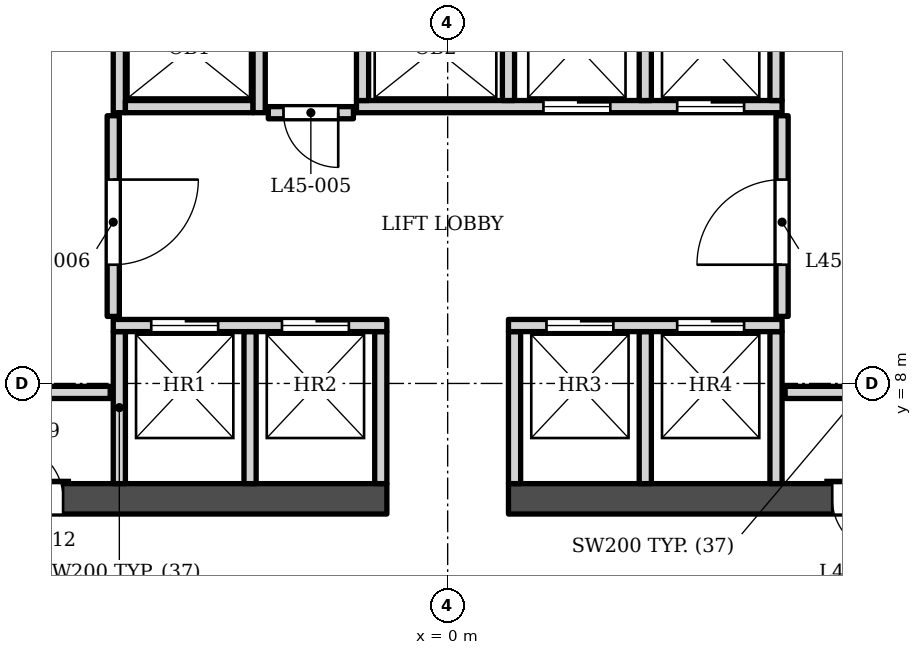
"""IFC4 building model, lengths in metres.
Left out: names, types, materials, properties, quantities, classifications, styles, units other than length and angle.
Written with IfcOpenShell. Run it as: python <this file> out.ifc"""

import sys

from ifc_helpers import new_model, si_unit, direction, frame, frame_2d, origin, place, context, subcontext, project, spatial, rectangle, extrude, element, fill, save


model = new_model("IFC4")
c1 = context("Model", 3, precision=1e-05, world=origin(), true_north=direction((0.0, 1.0)))
c2 = subcontext(c1, "Body", "Model", "MODEL_VIEW")
j1 = project(units=[si_unit("LENGTHUNIT", "METRE"), si_unit("PLANEANGLEUNIT", "RADIAN")], contexts=[c1])
p1 = place(None, origin())
s1 = spatial("IfcSite", under=j1, at=p1, CompositionType="ELEMENT")
p2 = place(p1, origin())
s2 = spatial("IfcBuilding", under=s1, at=p2, CompositionType="ELEMENT")
p3 = place(p2, frame((0.0, 0.0, 191.4)))
s3 = spatial("IfcBuildingStorey", under=s2, at=p3, CompositionType="ELEMENT", Elevation=191.4)
p4 = place(p3, frame((-8.05, 6.103, 0.0), z_axis=(0.0, 0.0, 1.0), x_axis=(1.0, 0.0, 0.0)))
e1 = element("IfcWall", 1, at=p4, inside=s3, PredefinedType="SHEAR", context=c2, shape_type="SweptSolid", body=[
    extrude(rectangle(XDim=7.05, YDim=0.5, at=frame_2d((3.525, 0.0))), origin(), (0.0, 0.0, 1.0), 5.0),
])
p5 = place(p4, frame((0.825, 0.0, 0.0)))
e2 = element("IfcOpeningElement", 2, at=p5, cuts=e1, PredefinedType="OPENING", context=c2, shape_type="SweptSolid", body=[
    extrude(rectangle(XDim=0.9, YDim=2.1, at=frame_2d((0.45, 1.05))), frame((0.0, 0.26, 0.0), z_axis=(0.0, -1.0, 0.0), x_axis=(1.0, 0.0, 0.0)), (0.0, 0.0, 1.0), 0.52),
])
p6 = place(p3, frame((1.0, 6.103, 0.0), z_axis=(0.0, 0.0, 1.0), x_axis=(1.0, 0.0, 0.0)))
e3 = element("IfcWall", 3, at=p6, inside=s3, PredefinedType="SHEAR", context=c2, shape_type="SweptSolid", body=[
    extrude(rectangle(XDim=7.05, YDim=0.5, at=frame_2d((3.525, 0.0))), origin(), (0.0, 0.0, 1.0), 5.0),
])
p7 = place(p6, frame((5.325, 0.0, 0.0)))
e4 = element("IfcOpeningElement", 4, at=p7, cuts=e3, PredefinedType="OPENING", context=c2, shape_type="SweptSolid", body=[
    extrude(rectangle(XDim=0.9, YDim=2.1, at=frame_2d((0.45, 1.05))), frame((0.0, 0.26, 0.0), z_axis=(0.0, -1.0, 0.0), x_axis=(1.0, 0.0, 0.0)), (0.0, 0.0, 1.0), 0.52),
])
for number, where, z_axis, x_axis in (
    (5, (-5.4, 6.353, 0.0), (0.0, 0.0, 1.0), (0.0, 1.0, 0.0)),
    (6, (-3.25, 6.353, 0.0), (0.0, 0.0, 1.0), (0.0, 1.0, 0.0)),
    (7, (-1.1, 6.353, 0.0), (0.0, 0.0, 1.0), (0.0, 1.0, 0.0)),
    (8, (1.1, 6.353, 0.0), (0.0, 0.0, 1.0), (0.0, 1.0, 0.0)),
    (9, (3.25, 6.353, 0.0), (0.0, 0.0, 1.0), (0.0, 1.0, 0.0)),
    (10, (5.4, 6.353, 0.0), (0.0, 0.0, 1.0), (0.0, 1.0, 0.0)),
    (11, (-8.05, 7.853, 0.0), (0.0, 0.0, 1.0), (1.0, 0.0, 0.0)),
    (12, (5.55, 7.853, 0.0), (0.0, 0.0, 1.0), (1.0, 0.0, 0.0)),
):
    element("IfcWall", number, at=place(p3, frame(where, z_axis=z_axis, x_axis=x_axis)), inside=s3, PredefinedType="SOLIDWALL", context=c2, shape_type="SweptSolid", body=[
        extrude(rectangle(XDim=2.5, YDim=0.2, at=frame_2d((1.25, 0.0))), origin(), (0.0, 0.0, 1.0), 4.83),
    ])
p8 = place(p3, frame((-5.5, 8.953, 0.0), z_axis=(0.0, 0.0, 1.0), x_axis=(1.0, 0.0, 0.0)))
e13 = element("IfcWall", 13, at=p8, inside=s3, PredefinedType="SOLIDWALL", context=c2, shape_type="SweptSolid", body=[
    extrude(rectangle(XDim=4.5, YDim=0.2, at=frame_2d((2.25, 0.0))), origin(), (0.0, 0.0, 1.0), 4.83),
])
p9 = place(p8, frame((0.625, 0.0, 0.0)))
e14 = element("IfcOpeningElement", 14, at=p9, cuts=e13, PredefinedType="OPENING", context=c2, shape_type="SweptSolid", body=[
    extrude(rectangle(XDim=1.1, YDim=2.1, at=frame_2d((0.55, 1.05))), frame((0.0, 0.11, 0.0), z_axis=(0.0, -1.0, 0.0), x_axis=(1.0, 0.0, 0.0)), (0.0, 0.0, 1.0), 0.22),
])
p10 = place(p8, frame((2.775, 0.0, 0.0)))
e15 = element("IfcOpeningElement", 15, at=p10, cuts=e13, PredefinedType="OPENING", context=c2, shape_type="SweptSolid", body=[
    extrude(rectangle(XDim=1.1, YDim=2.1, at=frame_2d((0.55, 1.05))), frame((0.0, 0.11, 0.0), z_axis=(0.0, -1.0, 0.0), x_axis=(1.0, 0.0, 0.0)), (0.0, 0.0, 1.0), 0.22),
])
p11 = place(p3, frame((1.0, 8.953, 0.0), z_axis=(0.0, 0.0, 1.0), x_axis=(1.0, 0.0, 0.0)))
e16 = element("IfcWall", 16, at=p11, inside=s3, PredefinedType="SOLIDWALL", context=c2, shape_type="SweptSolid", body=[
    extrude(rectangle(XDim=4.5, YDim=0.2, at=frame_2d((2.25, 0.0))), origin(), (0.0, 0.0, 1.0), 4.83),
])
p12 = place(p11, frame((0.625, 0.0, 0.0)))
e17 = element("IfcOpeningElement", 17, at=p12, cuts=e16, PredefinedType="OPENING", context=c2, shape_type="SweptSolid", body=[
    extrude(rectangle(XDim=1.1, YDim=2.1, at=frame_2d((0.55, 1.05))), frame((0.0, 0.11, 0.0), z_axis=(0.0, -1.0, 0.0), x_axis=(1.0, 0.0, 0.0)), (0.0, 0.0, 1.0), 0.22),
])
p13 = place(p11, frame((2.775, 0.0, 0.0)))
e18 = element("IfcOpeningElement", 18, at=p13, cuts=e16, PredefinedType="OPENING", context=c2, shape_type="SweptSolid", body=[
    extrude(rectangle(XDim=1.1, YDim=2.1, at=frame_2d((0.55, 1.05))), frame((0.0, 0.11, 0.0), z_axis=(0.0, -1.0, 0.0), x_axis=(1.0, 0.0, 0.0)), (0.0, 0.0, 1.0), 0.22),
])
p14 = place(p3, frame((-5.5, 9.103, 0.0), z_axis=(0.0, 0.0, 1.0), x_axis=(0.0, 1.0, 0.0)))
e19 = element("IfcWall", 19, at=p14, inside=s3, PredefinedType="SOLIDWALL", context=c2, shape_type="SweptSolid", body=[
    extrude(rectangle(XDim=3.3, YDim=0.2, at=frame_2d((1.65, 0.0))), origin(), (0.0, 0.0, 1.0), 4.83),
])
p15 = place(p14, frame((0.85, 0.0, 0.0)))
e20 = element("IfcOpeningElement", 20, at=p15, cuts=e19, PredefinedType="OPENING", context=c2, shape_type="SweptSolid", body=[
    extrude(rectangle(XDim=1.4, YDim=2.1, at=frame_2d((0.7, 1.05))), frame((0.0, 0.11, 0.0), z_axis=(0.0, -1.0, 0.0), x_axis=(1.0, 0.0, 0.0)), (0.0, 0.0, 1.0), 0.22),
])
p16 = place(p3, frame((5.5, 9.103, 0.0), z_axis=(0.0, 0.0, 1.0), x_axis=(0.0, 1.0, 0.0)))
e21 = element("IfcWall", 21, at=p16, inside=s3, PredefinedType="SOLIDWALL", context=c2, shape_type="SweptSolid", body=[
    extrude(rectangle(XDim=3.3, YDim=0.2, at=frame_2d((1.65, 0.0))), origin(), (0.0, 0.0, 1.0), 4.83),
])
p17 = place(p16, frame((0.85, 0.0, 0.0)))
e22 = element("IfcOpeningElement", 22, at=p17, cuts=e21, PredefinedType="OPENING", context=c2, shape_type="SweptSolid", body=[
    extrude(rectangle(XDim=1.4, YDim=2.1, at=frame_2d((0.7, 1.05))), frame((0.0, 0.11, 0.0), z_axis=(0.0, -1.0, 0.0), x_axis=(1.0, 0.0, 0.0)), (0.0, 0.0, 1.0), 0.22),
])
p18 = place(p3, frame((-2.95, 12.453, 0.0), z_axis=(0.0, 0.0, 1.0), x_axis=(1.0, 0.0, 0.0)))
e23 = element("IfcWall", 23, at=p18, inside=s3, PredefinedType="SOLIDWALL", context=c2, shape_type="SweptSolid", body=[
    extrude(rectangle(XDim=1.4, YDim=0.2, at=frame_2d((0.7, 0.0))), origin(), (0.0, 0.0, 1.0), 4.83),
])
p19 = place(p18, frame((0.25, 0.0, 0.0)))
e24 = element("IfcOpeningElement", 24, at=p19, cuts=e23, PredefinedType="OPENING", context=c2, shape_type="SweptSolid", body=[
    extrude(rectangle(XDim=0.9, YDim=2.1, at=frame_2d((0.45, 1.05))), frame((0.0, 0.11, 0.0), z_axis=(0.0, -1.0, 0.0), x_axis=(1.0, 0.0, 0.0)), (0.0, 0.0, 1.0), 0.22),
])
p20 = place(p3, frame((-5.4, 12.453, 0.0), z_axis=(0.0, 0.0, 1.0), x_axis=(0.0, 1.0, 0.0)))
e25 = element("IfcWall", 25, at=p20, inside=s3, PredefinedType="SOLIDWALL", context=c2, shape_type="SweptSolid", body=[
    extrude(rectangle(XDim=3.0, YDim=0.2, at=frame_2d((1.5, 0.0))), origin(), (0.0, 0.0, 1.0), 4.83),
])
p21 = place(p3, frame((-5.3, 12.552, 0.0), z_axis=(0.0, 0.0, 1.0), x_axis=(1.0, 0.0, 0.0)))
e26 = element("IfcWall", 26, at=p21, inside=s3, PredefinedType="SOLIDWALL", context=c2, shape_type="SweptSolid", body=[
    extrude(rectangle(XDim=2.1, YDim=0.2, at=frame_2d((1.05, 0.0))), origin(), (0.0, 0.0, 1.0), 4.83),
])
p22 = place(p3, frame((-3.1, 12.453, 0.0), z_axis=(0.0, 0.0, 1.0), x_axis=(0.0, 1.0, 0.0)))
e27 = element("IfcWall", 27, at=p22, inside=s3, PredefinedType="SOLIDWALL", context=c2, shape_type="SweptSolid", body=[
    extrude(rectangle(XDim=3.0, YDim=0.2, at=frame_2d((1.5, 0.0))), origin(), (0.0, 0.0, 1.0), 4.83),
])
p23 = place(p3, frame((-1.5, 12.552, 0.0), z_axis=(0.0, 0.0, 1.0), x_axis=(1.0, 0.0, 0.0)))
e28 = element("IfcWall", 28, at=p23, inside=s3, PredefinedType="SOLIDWALL", context=c2, shape_type="SweptSolid", body=[
    extrude(rectangle(XDim=7.0, YDim=0.2, at=frame_2d((3.5, 0.0))), origin(), (0.0, 0.0, 1.0), 4.83),
])
p24 = place(p23, frame((3.075, 0.0, 0.0)))
e29 = element("IfcOpeningElement", 29, at=p24, cuts=e28, PredefinedType="OPENING", context=c2, shape_type="SweptSolid", body=[
    extrude(rectangle(XDim=1.1, YDim=2.1, at=frame_2d((0.55, 1.05))), frame((0.0, 0.11, 0.0), z_axis=(0.0, -1.0, 0.0), x_axis=(1.0, 0.0, 0.0)), (0.0, 0.0, 1.0), 0.22),
])
p25 = place(p23, frame((5.275, 0.0, 0.0)))
e30 = element("IfcOpeningElement", 30, at=p25, cuts=e28, PredefinedType="OPENING", context=c2, shape_type="SweptSolid", body=[
    extrude(rectangle(XDim=1.1, YDim=2.1, at=frame_2d((0.55, 1.05))), frame((0.0, 0.11, 0.0), z_axis=(0.0, -1.0, 0.0), x_axis=(1.0, 0.0, 0.0)), (0.0, 0.0, 1.0), 0.22),
])
for number, where, z_axis, x_axis in (
    (31, (-1.4, 12.653, 0.0), (0.0, 0.0, 1.0), (0.0, 1.0, 0.0)),
    (32, (1.0, 12.653, 0.0), (0.0, 0.0, 1.0), (0.0, 1.0, 0.0)),
    (33, (3.25, 12.653, 0.0), (0.0, 0.0, 1.0), (0.0, 1.0, 0.0)),
):
    element("IfcWall", number, at=place(p3, frame(where, z_axis=z_axis, x_axis=x_axis)), inside=s3, PredefinedType="SOLIDWALL", context=c2, shape_type="SweptSolid", body=[
        extrude(rectangle(XDim=2.6, YDim=0.2, at=frame_2d((1.3, 0.0))), origin(), (0.0, 0.0, 1.0), 4.83),
    ])
p26 = place(p3, frame((5.4, 12.653, 0.0), z_axis=(0.0, 0.0, 1.0), x_axis=(0.0, 1.0, 0.0)))
e34 = element("IfcWall", 34, at=p26, inside=s3, PredefinedType="SOLIDWALL", context=c2, shape_type="SweptSolid", body=[
    extrude(rectangle(XDim=1.6, YDim=0.2, at=frame_2d((0.8, 0.0))), origin(), (0.0, 0.0, 1.0), 4.83),
])
p27 = place(p9, origin())
e35 = element("IfcDoor", 35, at=p27, inside=s3, OperationType="DOUBLE_DOOR_SLIDING", PredefinedType="DOOR", context=c2, shape_type="SweptSolid", body=[
    extrude(rectangle(XDim=1.1, YDim=2.1, at=frame_2d((0.55, 1.05))), frame((0.0, 0.025, 0.0), z_axis=(0.0, -1.0, 0.0), x_axis=(1.0, 0.0, 0.0)), (0.0, 0.0, 1.0), 0.05),
])
fill(e14, e35)
p28 = place(p10, origin())
e36 = element("IfcDoor", 36, at=p28, inside=s3, OperationType="DOUBLE_DOOR_SLIDING", PredefinedType="DOOR", context=c2, shape_type="SweptSolid", body=[
    extrude(rectangle(XDim=1.1, YDim=2.1, at=frame_2d((0.55, 1.05))), frame((0.0, 0.025, 0.0), z_axis=(0.0, -1.0, 0.0), x_axis=(1.0, 0.0, 0.0)), (0.0, 0.0, 1.0), 0.05),
])
fill(e15, e36)
p29 = place(p12, origin())
e37 = element("IfcDoor", 37, at=p29, inside=s3, OperationType="DOUBLE_DOOR_SLIDING", PredefinedType="DOOR", context=c2, shape_type="SweptSolid", body=[
    extrude(rectangle(XDim=1.1, YDim=2.1, at=frame_2d((0.55, 1.05))), frame((0.0, 0.025, 0.0), z_axis=(0.0, -1.0, 0.0), x_axis=(1.0, 0.0, 0.0)), (0.0, 0.0, 1.0), 0.05),
])
fill(e17, e37)
p30 = place(p13, origin())
e38 = element("IfcDoor", 38, at=p30, inside=s3, OperationType="DOUBLE_DOOR_SLIDING", PredefinedType="DOOR", context=c2, shape_type="SweptSolid", body=[
    extrude(rectangle(XDim=1.1, YDim=2.1, at=frame_2d((0.55, 1.05))), frame((0.0, 0.025, 0.0), z_axis=(0.0, -1.0, 0.0), x_axis=(1.0, 0.0, 0.0)), (0.0, 0.0, 1.0), 0.05),
])
fill(e18, e38)
p31 = place(p24, origin())
e39 = element("IfcDoor", 39, at=p31, inside=s3, OperationType="DOUBLE_DOOR_SLIDING", PredefinedType="DOOR", context=c2, shape_type="SweptSolid", body=[
    extrude(rectangle(XDim=1.1, YDim=2.1, at=frame_2d((0.55, 1.05))), frame((0.0, 0.025, 0.0), z_axis=(0.0, -1.0, 0.0), x_axis=(1.0, 0.0, 0.0)), (0.0, 0.0, 1.0), 0.05),
])
fill(e29, e39)
p32 = place(p25, origin())
e40 = element("IfcDoor", 40, at=p32, inside=s3, OperationType="DOUBLE_DOOR_SLIDING", PredefinedType="DOOR", context=c2, shape_type="SweptSolid", body=[
    extrude(rectangle(XDim=1.1, YDim=2.1, at=frame_2d((0.55, 1.05))), frame((0.0, 0.025, 0.0), z_axis=(0.0, -1.0, 0.0), x_axis=(1.0, 0.0, 0.0)), (0.0, 0.0, 1.0), 0.05),
])
fill(e30, e40)
p33 = place(p19, origin())
e41 = element("IfcDoor", 41, at=p33, inside=s3, OperationType="SINGLE_SWING_RIGHT", PredefinedType="DOOR", context=c2, shape_type="SweptSolid", body=[
    extrude(rectangle(XDim=0.9, YDim=2.1, at=frame_2d((0.45, 1.05))), frame((0.0, 0.025, 0.0), z_axis=(0.0, -1.0, 0.0), x_axis=(1.0, 0.0, 0.0)), (0.0, 0.0, 1.0), 0.05),
])
fill(e24, e41)
p34 = place(p15, origin())
e42 = element("IfcDoor", 42, at=p34, inside=s3, OperationType="SINGLE_SWING_RIGHT", PredefinedType="DOOR", context=c2, shape_type="SweptSolid", body=[
    extrude(rectangle(XDim=1.4, YDim=2.1, at=frame_2d((0.7, 1.05))), frame((0.0, 0.025, 0.0), z_axis=(0.0, -1.0, 0.0), x_axis=(1.0, 0.0, 0.0)), (0.0, 0.0, 1.0), 0.05),
])
fill(e20, e42)
p35 = place(p17, origin())
e43 = element("IfcDoor", 43, at=p35, inside=s3, OperationType="SINGLE_SWING_LEFT", PredefinedType="DOOR", context=c2, shape_type="SweptSolid", body=[
    extrude(rectangle(XDim=1.4, YDim=2.1, at=frame_2d((0.7, 1.05))), frame((0.0, 0.025, 0.0), z_axis=(0.0, -1.0, 0.0), x_axis=(1.0, 0.0, 0.0)), (0.0, 0.0, 1.0), 0.05),
])
fill(e22, e43)
p36 = place(p5, origin())
e44 = element("IfcDoor", 44, at=p36, inside=s3, OperationType="SINGLE_SWING_LEFT", PredefinedType="DOOR", context=c2, shape_type="SweptSolid", body=[
    extrude(rectangle(XDim=0.9, YDim=2.1, at=frame_2d((0.45, 1.05))), frame((0.0, 0.025, 0.0), z_axis=(0.0, -1.0, 0.0), x_axis=(1.0, 0.0, 0.0)), (0.0, 0.0, 1.0), 0.05),
])
fill(e2, e44)
p37 = place(p7, origin())
e45 = element("IfcDoor", 45, at=p37, inside=s3, OperationType="SINGLE_SWING_RIGHT", PredefinedType="DOOR", context=c2, shape_type="SweptSolid", body=[
    extrude(rectangle(XDim=0.9, YDim=2.1, at=frame_2d((0.45, 1.05))), frame((0.0, 0.025, 0.0), z_axis=(0.0, -1.0, 0.0), x_axis=(1.0, 0.0, 0.0)), (0.0, 0.0, 1.0), 0.05),
])
fill(e4, e45)
save(model, sys.argv[1])
